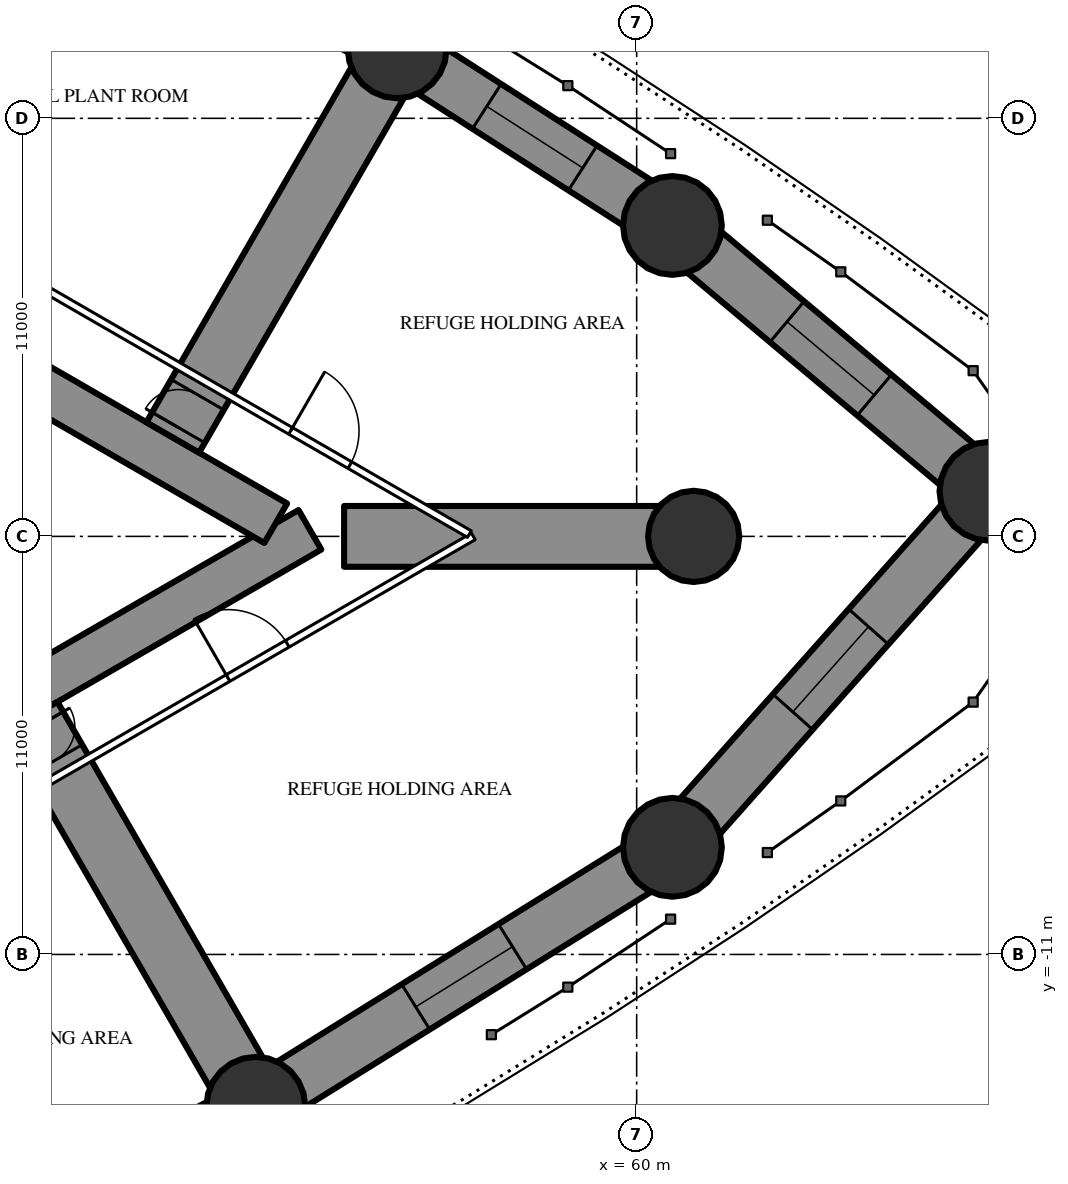
"""IFC4 building model, lengths in metres.
Left out: names, types, materials, properties, quantities, classifications, styles, units other than length and angle.
Written with IfcOpenShell. Run it as: python <this file> out.ifc"""

import sys

from ifc_helpers import new_model, si_unit, direction, frame, frame_2d, origin, origin_2d, place, context, subcontext, project, spatial, rectangle, circle, hollow_circle, extrude, element, fill, save


model = new_model("IFC4")
c1 = context("Model", 3, precision=1e-05, world=origin(), true_north=direction((0.0, 1.0)))
c2 = subcontext(c1, "Body", "Model", "MODEL_VIEW")
j1 = project(units=[si_unit("LENGTHUNIT", "METRE"), si_unit("PLANEANGLEUNIT", "RADIAN")], contexts=[c1])
p1 = place(None, origin())
s1 = spatial("IfcSite", under=j1, at=p1, CompositionType="ELEMENT")
p2 = place(p1, origin())
s2 = spatial("IfcBuilding", under=s1, at=p2, CompositionType="ELEMENT")
p3 = place(p2, frame((0.0, 0.0, 87.0)))
s3 = spatial("IfcBuildingStorey", under=s2, at=p3, CompositionType="ELEMENT", Elevation=87.0)
for number, where, z_axis, x_axis in (
    (1, (69.269, 1.187, 0.0), (0.0, 0.0, 1.0), (1.0, 0.0, 0.0)),
    (2, (60.941, 8.181, 0.0), (0.0, 0.0, 1.0), (1.0, 0.0, 0.0)),
    (3, (53.697, 12.827, 0.0), (0.0, 0.0, 1.0), (1.0, 0.0, 0.0)),
    (4, (49.979, -14.994, 0.0), (0.0, 0.0, 1.0), (1.0, 0.0, 0.0)),
    (5, (60.941, -8.181, 0.0), (0.0, 0.0, 1.0), (1.0, 0.0, 0.0)),
):
    element("IfcColumn", number, at=place(p3, frame(where, z_axis=z_axis, x_axis=x_axis)), inside=s3, PredefinedType="COLUMN", context=c2, shape_type="SweptSolid", body=[
        extrude(hollow_circle(Radius=1.3, WallThickness=0.1, at=origin_2d()), origin(), (0.0, 0.0, 1.0), 3.6),
    ])
p4 = place(p3, frame((61.5, 0.0, 0.0), z_axis=(0.0, 0.0, 1.0), x_axis=(1.0, 0.0, 0.0)))
e6 = element("IfcColumn", 6, at=p4, inside=s3, PredefinedType="COLUMN", context=c2, shape_type="SweptSolid", body=[
    extrude(circle(Radius=1.2, at=origin_2d()), origin(), (0.0, 0.0, 1.0), 3.6),
])
p5 = place(p3, frame((27.2, -13.8, 0.0), z_axis=(0.0, 0.0, 1.0), x_axis=(0.866027159892, 0.499996958321, 0.0)))
e7 = element("IfcWall", 7, at=p5, inside=s3, PredefinedType="SHEAR", context=c2, shape_type="SweptSolid", body=[
    extrude(rectangle(XDim=27.947, YDim=1.2, at=frame_2d((13.973, 0.0))), origin(), (0.0, 0.0, 1.0), 3.6),
])
p6 = place(p5, frame((4.6, 0.0, 0.0)))
e8 = element("IfcOpeningElement", 8, at=p6, cuts=e7, PredefinedType="OPENING", context=c2, shape_type="SweptSolid", body=[
    extrude(rectangle(XDim=1.0, YDim=2.2, at=frame_2d((0.5, 1.1))), frame((0.0, 0.61, 0.0), z_axis=(0.0, -1.0, 0.0), x_axis=(1.0, 0.0, 0.0)), (0.0, 0.0, 1.0), 1.22),
])
p7 = place(p5, frame((14.018, 0.0, 0.0)))
e9 = element("IfcOpeningElement", 9, at=p7, cuts=e7, PredefinedType="OPENING", context=c2, shape_type="SweptSolid", body=[
    extrude(rectangle(XDim=1.8, YDim=2.2, at=frame_2d((0.9, 1.1))), frame((0.0, 0.61, 0.0), z_axis=(0.0, -1.0, 0.0), x_axis=(1.0, 0.0, 0.0)), (0.0, 0.0, 1.0), 1.22),
])
p8 = place(p3, frame((27.2, 13.8, 0.0), z_axis=(0.0, 0.0, 1.0), x_axis=(0.866024515034, -0.500001539357, 0.0)))
e10 = element("IfcWall", 10, at=p8, inside=s3, PredefinedType="SHEAR", context=c2, shape_type="SweptSolid", body=[
    extrude(rectangle(XDim=26.907, YDim=1.2, at=frame_2d((13.454, 0.0))), origin(), (0.0, 0.0, 1.0), 3.6),
])
p9 = place(p8, frame((5.95, 0.0, 0.0)))
e11 = element("IfcOpeningElement", 11, at=p9, cuts=e10, PredefinedType="OPENING", context=c2, shape_type="SweptSolid", body=[
    extrude(rectangle(XDim=1.0, YDim=2.2, at=frame_2d((0.5, 1.1))), frame((0.0, 0.61, 0.0), z_axis=(0.0, -1.0, 0.0), x_axis=(1.0, 0.0, 0.0)), (0.0, 0.0, 1.0), 1.22),
])
p10 = place(p8, frame((13.568, 0.0, 0.0)))
e12 = element("IfcOpeningElement", 12, at=p10, cuts=e10, PredefinedType="OPENING", context=c2, shape_type="SweptSolid", body=[
    extrude(rectangle(XDim=1.8, YDim=2.03, at=frame_2d((0.9, 1.015))), frame((0.0, 0.61, 0.0), z_axis=(0.0, -1.0, 0.0), x_axis=(1.0, 0.0, 0.0)), (0.0, 0.0, 1.0), 1.22),
])
p11 = place(p3, frame((44.067, -4.754, 0.0), z_axis=(0.0, 0.0, 1.0), x_axis=(0.499987574995, -0.866032577246, 0.0)))
e13 = element("IfcWall", 13, at=p11, inside=s3, PredefinedType="SHEAR", context=c2, shape_type="SweptSolid", body=[
    extrude(rectangle(XDim=11.824, YDim=1.6, at=frame_2d((5.912, 0.0))), origin(), (0.0, 0.0, 1.0), 3.6),
])
p12 = place(p11, frame((0.3, 0.0, 0.0)))
e14 = element("IfcOpeningElement", 14, at=p12, cuts=e13, PredefinedType="OPENING", context=c2, shape_type="SweptSolid", body=[
    extrude(rectangle(XDim=1.0, YDim=2.2, at=frame_2d((0.5, 1.1))), frame((0.0, 0.81, 0.0), z_axis=(0.0, -1.0, 0.0), x_axis=(1.0, 0.0, 0.0)), (0.0, 0.0, 1.0), 1.62),
])
p13 = place(p3, frame((52.302, 0.0, 0.0), z_axis=(0.0, 0.0, 1.0), x_axis=(1.0, 0.0, 0.0)))
e15 = element("IfcWall", 15, at=p13, inside=s3, PredefinedType="SHEAR", context=c2, shape_type="SweptSolid", body=[
    extrude(rectangle(XDim=9.198, YDim=1.6, at=frame_2d((4.599, 0.0))), origin(), (0.0, 0.0, 1.0), 3.6),
])
p14 = place(p3, frame((47.794, 2.603, 0.0), z_axis=(0.0, 0.0, 1.0), x_axis=(0.499993342329, 0.866029247559, 0.0)))
e16 = element("IfcWall", 16, at=p14, inside=s3, PredefinedType="SHEAR", context=c2, shape_type="SweptSolid", body=[
    extrude(rectangle(XDim=11.806, YDim=1.6, at=frame_2d((5.903, 0.0))), origin(), (0.0, 0.0, 1.0), 3.6),
])
p15 = place(p14, frame((0.3, 0.0, 0.0)))
e17 = element("IfcOpeningElement", 17, at=p15, cuts=e16, PredefinedType="OPENING", context=c2, shape_type="SweptSolid", body=[
    extrude(rectangle(XDim=1.0, YDim=2.2, at=frame_2d((0.5, 1.1))), frame((0.0, 0.81, 0.0), z_axis=(0.0, -1.0, 0.0), x_axis=(1.0, 0.0, 0.0)), (0.0, 0.0, 1.0), 1.62),
])
p16 = place(p3, frame((42.366, -19.007, 0.0), z_axis=(0.0, 0.0, 1.0), x_axis=(0.884632510133, 0.466288882578, 0.0)))
e18 = element("IfcWall", 18, at=p16, inside=s3, PredefinedType="SHEAR", context=c2, shape_type="SweptSolid", body=[
    extrude(rectangle(XDim=8.606, YDim=1.4, at=frame_2d((4.303, 0.0))), origin(), (0.0, 0.0, 1.0), 3.6),
])
p17 = place(p16, frame((2.803, 0.0, 0.6)))
e19 = element("IfcOpeningElement", 19, at=p17, cuts=e18, PredefinedType="OPENING", context=c2, shape_type="SweptSolid", body=[
    extrude(rectangle(XDim=3.0, YDim=1.2, at=frame_2d((1.5, 0.6))), frame((0.0, 0.71, 0.0), z_axis=(0.0, -1.0, 0.0), x_axis=(1.0, 0.0, 0.0)), (0.0, 0.0, 1.0), 1.42),
])
p18 = place(p3, frame((49.979, -14.994, 0.0), z_axis=(0.0, 0.0, 1.0), x_axis=(0.849312372751, 0.527890607505, 0.0)))
e20 = element("IfcWall", 20, at=p18, inside=s3, PredefinedType="SHEAR", context=c2, shape_type="SweptSolid", body=[
    extrude(rectangle(XDim=12.906, YDim=1.4, at=frame_2d((6.453, 0.0))), origin(), (0.0, 0.0, 1.0), 3.6),
])
p19 = place(p18, frame((4.953, 0.0, 0.6)))
e21 = element("IfcOpeningElement", 21, at=p19, cuts=e20, PredefinedType="OPENING", context=c2, shape_type="SweptSolid", body=[
    extrude(rectangle(XDim=3.0, YDim=1.2, at=frame_2d((1.5, 0.6))), frame((0.0, 0.71, 0.0), z_axis=(0.0, -1.0, 0.0), x_axis=(1.0, 0.0, 0.0)), (0.0, 0.0, 1.0), 1.42),
])
p20 = place(p3, frame((60.941, -8.181, 0.0), z_axis=(0.0, 0.0, 1.0), x_axis=(0.664421866815, 0.74735773422, 0.0)))
e22 = element("IfcWall", 22, at=p20, inside=s3, PredefinedType="SHEAR", context=c2, shape_type="SweptSolid", body=[
    extrude(rectangle(XDim=12.534, YDim=1.4, at=frame_2d((6.267, 0.0))), origin(), (0.0, 0.0, 1.0), 3.6),
])
p21 = place(p20, frame((4.767, 0.0, 0.6)))
e23 = element("IfcOpeningElement", 23, at=p21, cuts=e22, PredefinedType="OPENING", context=c2, shape_type="SweptSolid", body=[
    extrude(rectangle(XDim=3.0, YDim=1.2, at=frame_2d((1.5, 0.6))), frame((0.0, 0.71, 0.0), z_axis=(0.0, -1.0, 0.0), x_axis=(1.0, 0.0, 0.0)), (0.0, 0.0, 1.0), 1.42),
])
p22 = place(p3, frame((69.269, 1.187, 0.0), z_axis=(0.0, 0.0, 1.0), x_axis=(-0.765749969712, 0.643138386264, 0.0)))
e24 = element("IfcWall", 24, at=p22, inside=s3, PredefinedType="SHEAR", context=c2, shape_type="SweptSolid", body=[
    extrude(rectangle(XDim=10.876, YDim=1.4, at=frame_2d((5.438, 0.0))), origin(), (0.0, 0.0, 1.0), 3.6),
])
p23 = place(p22, frame((3.938, 0.0, 0.6)))
e25 = element("IfcOpeningElement", 25, at=p23, cuts=e24, PredefinedType="OPENING", context=c2, shape_type="SweptSolid", body=[
    extrude(rectangle(XDim=3.0, YDim=1.2, at=frame_2d((1.5, 0.6))), frame((0.0, 0.71, 0.0), z_axis=(0.0, -1.0, 0.0), x_axis=(1.0, 0.0, 0.0)), (0.0, 0.0, 1.0), 1.42),
])
p24 = place(p3, frame((60.941, 8.181, 0.0), z_axis=(0.0, 0.0, 1.0), x_axis=(-0.841727408736, 0.539902740669, 0.0)))
e26 = element("IfcWall", 26, at=p24, inside=s3, PredefinedType="SHEAR", context=c2, shape_type="SweptSolid", body=[
    extrude(rectangle(XDim=8.606, YDim=1.4, at=frame_2d((4.303, 0.0))), origin(), (0.0, 0.0, 1.0), 3.6),
])
p25 = place(p24, frame((2.803, 0.0, 0.6)))
e27 = element("IfcOpeningElement", 27, at=p25, cuts=e26, PredefinedType="OPENING", context=c2, shape_type="SweptSolid", body=[
    extrude(rectangle(XDim=3.0, YDim=1.2, at=frame_2d((1.5, 0.6))), frame((0.0, 0.71, 0.0), z_axis=(0.0, -1.0, 0.0), x_axis=(1.0, 0.0, 0.0)), (0.0, 0.0, 1.0), 1.42),
])
p26 = place(p3, frame((53.697, 12.827, 0.0), z_axis=(0.0, 0.0, 1.0), x_axis=(-0.87792015078, 0.478807068509, 0.0)))
e28 = element("IfcWall", 28, at=p26, inside=s3, PredefinedType="SHEAR", context=c2, shape_type="SweptSolid", body=[
    extrude(rectangle(XDim=12.906, YDim=1.4, at=frame_2d((6.453, 0.0))), origin(), (0.0, 0.0, 1.0), 3.6),
])
p27 = place(p26, frame((4.953, 0.0, 0.6)))
e29 = element("IfcOpeningElement", 29, at=p27, cuts=e28, PredefinedType="OPENING", context=c2, shape_type="SweptSolid", body=[
    extrude(rectangle(XDim=3.0, YDim=1.2, at=frame_2d((1.5, 0.6))), frame((0.0, 0.71, 0.0), z_axis=(0.0, -1.0, 0.0), x_axis=(1.0, 0.0, 0.0)), (0.0, 0.0, 1.0), 1.42),
])
p28 = place(p3, frame((37.96, -10.243, 0.0), z_axis=(0.0, 0.0, 1.0), x_axis=(0.866026429433, 0.499998223521, 0.0)))
e30 = element("IfcWall", 30, at=p28, inside=s3, PredefinedType="PARTITIONING", context=c2, shape_type="SweptSolid", body=[
    extrude(rectangle(XDim=20.487, YDim=0.2, at=frame_2d((10.243, 0.0))), origin(), (0.0, 0.0, 1.0), 3.35),
])
p29 = place(p28, frame((13.034, 0.0, 0.0)))
e31 = element("IfcOpeningElement", 31, at=p29, cuts=e30, PredefinedType="OPENING", context=c2, shape_type="SweptSolid", body=[
    extrude(rectangle(XDim=1.8, YDim=2.2, at=frame_2d((0.9, 1.1))), frame((0.0, 0.11, 0.0), z_axis=(0.0, -1.0, 0.0), x_axis=(1.0, 0.0, 0.0)), (0.0, 0.0, 1.0), 0.22),
])
p30 = place(p28, frame((2.992, 0.0, 0.0)))
e32 = element("IfcOpeningElement", 32, at=p30, cuts=e30, PredefinedType="OPENING", context=c2, shape_type="SweptSolid", body=[
    extrude(rectangle(XDim=1.8, YDim=2.2, at=frame_2d((0.9, 1.1))), frame((0.0, 0.11, 0.0), z_axis=(0.0, -1.0, 0.0), x_axis=(1.0, 0.0, 0.0)), (0.0, 0.0, 1.0), 0.22),
])
p31 = place(p3, frame((36.834, 10.894, 0.0), z_axis=(0.0, 0.0, 1.0), x_axis=(0.866028157229, -0.499995230863, 0.0)))
e33 = element("IfcWall", 33, at=p31, inside=s3, PredefinedType="PARTITIONING", context=c2, shape_type="SweptSolid", body=[
    extrude(rectangle(XDim=21.667, YDim=0.2, at=frame_2d((10.833, 0.0))), origin(), (0.0, 0.0, 1.0), 3.35),
])
p32 = place(p31, frame((16.236, 0.0, 0.0)))
e34 = element("IfcOpeningElement", 34, at=p32, cuts=e33, PredefinedType="OPENING", context=c2, shape_type="SweptSolid", body=[
    extrude(rectangle(XDim=1.8, YDim=2.2, at=frame_2d((0.9, 1.1))), frame((0.0, 0.11, 0.0), z_axis=(0.0, -1.0, 0.0), x_axis=(1.0, 0.0, 0.0)), (0.0, 0.0, 1.0), 0.22),
])
p33 = place(p31, frame((5.696, 0.0, 0.0)))
e35 = element("IfcOpeningElement", 35, at=p33, cuts=e33, PredefinedType="OPENING", context=c2, shape_type="SweptSolid", body=[
    extrude(rectangle(XDim=2.0, YDim=2.4, at=frame_2d((1.0, 1.2))), frame((0.0, 0.11, 0.0), z_axis=(0.0, -1.0, 0.0), x_axis=(1.0, 0.0, 0.0)), (0.0, 0.0, 1.0), 0.22),
])
p34 = place(p19, origin())
e36 = element("IfcWindow", 36, at=p34, inside=s3, PartitioningType="SINGLE_PANEL", PredefinedType="WINDOW", context=c2, shape_type="SweptSolid", body=[
    extrude(rectangle(XDim=3.0, YDim=1.2, at=frame_2d((1.5, 0.6))), frame((0.0, 0.03, 0.0), z_axis=(0.0, -1.0, 0.0), x_axis=(1.0, 0.0, 0.0)), (0.0, 0.0, 1.0), 0.06),
])
fill(e21, e36)
p35 = place(p21, origin())
e37 = element("IfcWindow", 37, at=p35, inside=s3, PartitioningType="SINGLE_PANEL", PredefinedType="WINDOW", context=c2, shape_type="SweptSolid", body=[
    extrude(rectangle(XDim=3.0, YDim=1.2, at=frame_2d((1.5, 0.6))), frame((0.0, 0.03, 0.0), z_axis=(0.0, -1.0, 0.0), x_axis=(1.0, 0.0, 0.0)), (0.0, 0.0, 1.0), 0.06),
])
fill(e23, e37)
p36 = place(p23, origin())
e38 = element("IfcWindow", 38, at=p36, inside=s3, PartitioningType="SINGLE_PANEL", PredefinedType="WINDOW", context=c2, shape_type="SweptSolid", body=[
    extrude(rectangle(XDim=3.0, YDim=1.2, at=frame_2d((1.5, 0.6))), frame((0.0, 0.03, 0.0), z_axis=(0.0, -1.0, 0.0), x_axis=(1.0, 0.0, 0.0)), (0.0, 0.0, 1.0), 0.06),
])
fill(e25, e38)
p37 = place(p25, origin())
e39 = element("IfcWindow", 39, at=p37, inside=s3, PartitioningType="SINGLE_PANEL", PredefinedType="WINDOW", context=c2, shape_type="SweptSolid", body=[
    extrude(rectangle(XDim=3.0, YDim=1.2, at=frame_2d((1.5, 0.6))), frame((0.0, 0.03, 0.0), z_axis=(0.0, -1.0, 0.0), x_axis=(1.0, 0.0, 0.0)), (0.0, 0.0, 1.0), 0.06),
])
fill(e27, e39)
p38 = place(p12, origin())
e40 = element("IfcDoor", 40, at=p38, inside=s3, OperationType="SINGLE_SWING_LEFT", PredefinedType="DOOR", context=c2, shape_type="SweptSolid", body=[
    extrude(rectangle(XDim=1.0, YDim=2.2, at=frame_2d((0.5, 1.1))), frame((0.0, 0.025, 0.0), z_axis=(0.0, -1.0, 0.0), x_axis=(1.0, 0.0, 0.0)), (0.0, 0.0, 1.0), 0.05),
])
fill(e14, e40)
p39 = place(p15, origin())
e41 = element("IfcDoor", 41, at=p39, inside=s3, OperationType="SINGLE_SWING_LEFT", PredefinedType="DOOR", context=c2, shape_type="SweptSolid", body=[
    extrude(rectangle(XDim=1.0, YDim=2.2, at=frame_2d((0.5, 1.1))), frame((0.0, 0.025, 0.0), z_axis=(0.0, -1.0, 0.0), x_axis=(1.0, 0.0, 0.0)), (0.0, 0.0, 1.0), 0.05),
])
fill(e17, e41)
p40 = place(p29, origin())
e42 = element("IfcDoor", 42, at=p40, inside=s3, OperationType="DOUBLE_DOOR_SINGLE_SWING", PredefinedType="DOOR", context=c2, shape_type="SweptSolid", body=[
    extrude(rectangle(XDim=1.8, YDim=2.2, at=frame_2d((0.9, 1.1))), frame((0.0, 0.025, 0.0), z_axis=(0.0, -1.0, 0.0), x_axis=(1.0, 0.0, 0.0)), (0.0, 0.0, 1.0), 0.05),
])
fill(e31, e42)
p41 = place(p32, origin())
e43 = element("IfcDoor", 43, at=p41, inside=s3, OperationType="DOUBLE_DOOR_SINGLE_SWING", PredefinedType="DOOR", context=c2, shape_type="SweptSolid", body=[
    extrude(rectangle(XDim=1.8, YDim=2.2, at=frame_2d((0.9, 1.1))), frame((0.0, 0.025, 0.0), z_axis=(0.0, -1.0, 0.0), x_axis=(1.0, 0.0, 0.0)), (0.0, 0.0, 1.0), 0.05),
])
fill(e34, e43)
save(model, sys.argv[1])
